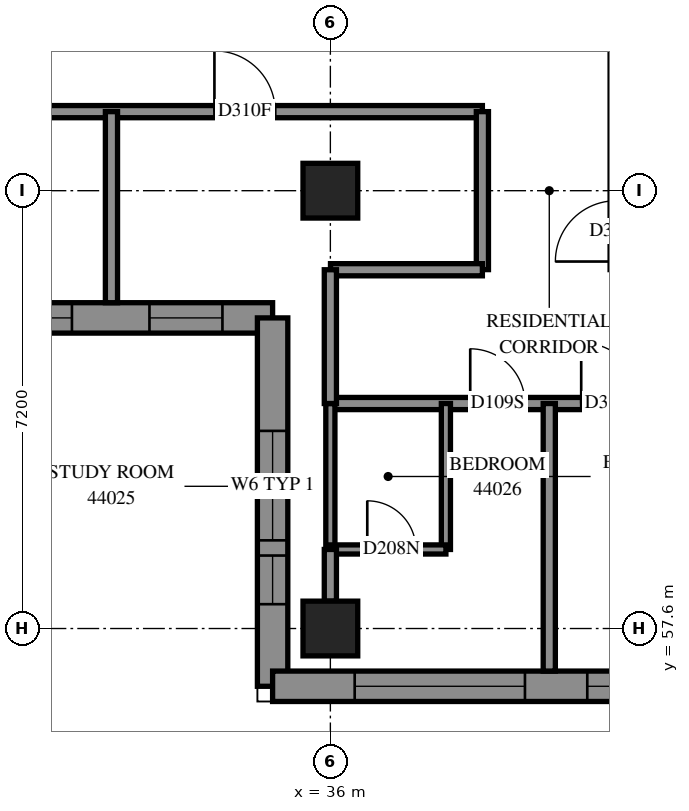
"""IFC4 building model, lengths in metres.
Left out: names, types, materials, properties, quantities, classifications, styles, units other than length and angle.
Written with IfcOpenShell. Run it as: python <this file> out.ifc"""

import sys

from ifc_helpers import new_model, si_unit, direction, frame, frame_2d, origin, origin_2d, place, context, subcontext, project, spatial, polyline, rectangle, outline, extrude, element, fill, save


model = new_model("IFC4")
c1 = context("Model", 3, precision=1e-05, world=origin(), true_north=direction((0.0, 1.0)))
c2 = subcontext(c1, "Body", "Model", "MODEL_VIEW")
j1 = project(units=[si_unit("LENGTHUNIT", "METRE"), si_unit("PLANEANGLEUNIT", "RADIAN")], contexts=[c1])
p1 = place(None, origin())
s1 = spatial("IfcSite", under=j1, at=p1, CompositionType="ELEMENT")
p2 = place(p1, origin())
s2 = spatial("IfcBuilding", under=s1, at=p2, CompositionType="ELEMENT")
p3 = place(p2, frame((0.0, 0.0, 162.6)))
s3 = spatial("IfcBuildingStorey", under=s2, at=p3, CompositionType="ELEMENT", Elevation=162.6)
for number, where, z_axis, x_axis in (
    (1, (36.0, 57.6, 0.0), (0.0, 0.0, 1.0), (1.0, 0.0, 0.0)),
    (2, (36.0, 64.8, 0.0), (0.0, 0.0, 1.0), (1.0, 0.0, 0.0)),
):
    element("IfcColumn", number, at=place(p3, frame(where, z_axis=z_axis, x_axis=x_axis)), inside=s3, PredefinedType="COLUMN", context=c2, shape_type="SweptSolid", body=[
        extrude(rectangle(XDim=0.9, YDim=0.9, at=origin_2d()), origin(), (0.0, 0.0, 1.0), 3.1),
    ])
p4 = place(p3, frame((19.508, 62.708, 0.0), z_axis=(0.0, 0.0, 1.0), x_axis=(1.0, 0.0, 0.0)))
e3 = element("IfcWall", 3, at=p4, inside=s3, PredefinedType="SOLIDWALL", context=c2, shape_type="SweptSolid", body=[
    extrude(outline(polyline([(-0.25, -0.25), (15.292, -0.25), (15.792, 0.25), (0.25, 0.25), (-0.25, -0.25)])), origin(), (0.0, 0.0, 1.0), 3.1),
])
p5 = place(p4, frame((2.492, 0.0, 0.45)))
e4 = element("IfcOpeningElement", 4, at=p5, cuts=e3, PredefinedType="OPENING", context=c2, shape_type="SweptSolid", body=[
    extrude(rectangle(XDim=2.8, YDim=2.5, at=frame_2d((1.4, 1.25))), frame((0.0, 0.26, 0.0), z_axis=(0.0, -1.0, 0.0), x_axis=(1.0, 0.0, 0.0)), (0.0, 0.0, 1.0), 0.52),
])
p6 = place(p4, frame((6.092, 0.0, 0.45)))
e5 = element("IfcOpeningElement", 5, at=p6, cuts=e3, PredefinedType="OPENING", context=c2, shape_type="SweptSolid", body=[
    extrude(rectangle(XDim=2.8, YDim=2.5, at=frame_2d((1.4, 1.25))), frame((0.0, 0.26, 0.0), z_axis=(0.0, -1.0, 0.0), x_axis=(1.0, 0.0, 0.0)), (0.0, 0.0, 1.0), 0.52),
])
p7 = place(p4, frame((9.442, 0.0, 0.45)))
e6 = element("IfcOpeningElement", 6, at=p7, cuts=e3, PredefinedType="OPENING", context=c2, shape_type="SweptSolid", body=[
    extrude(rectangle(XDim=2.8, YDim=2.5, at=frame_2d((1.4, 1.25))), frame((0.0, 0.26, 0.0), z_axis=(0.0, -1.0, 0.0), x_axis=(1.0, 0.0, 0.0)), (0.0, 0.0, 1.0), 0.52),
])
p8 = place(p4, frame((0.671, 0.0, 0.45)))
e7 = element("IfcOpeningElement", 7, at=p8, cuts=e3, PredefinedType="OPENING", context=c2, shape_type="SweptSolid", body=[
    extrude(rectangle(XDim=1.2, YDim=2.5, at=frame_2d((0.6, 1.25))), frame((0.0, 0.26, 0.0), z_axis=(0.0, -1.0, 0.0), x_axis=(1.0, 0.0, 0.0)), (0.0, 0.0, 1.0), 0.52),
])
p9 = place(p4, frame((13.517, 0.0, 0.45)))
e8 = element("IfcOpeningElement", 8, at=p9, cuts=e3, PredefinedType="OPENING", context=c2, shape_type="SweptSolid", body=[
    extrude(rectangle(XDim=1.2, YDim=2.5, at=frame_2d((0.6, 1.25))), frame((0.0, 0.26, 0.0), z_axis=(0.0, -1.0, 0.0), x_axis=(1.0, 0.0, 0.0)), (0.0, 0.0, 1.0), 0.52),
])
p10 = place(p3, frame((35.05, 62.708, 0.0), z_axis=(0.0, 0.0, 1.0), x_axis=(0.0, -1.0, 0.0)))
e9 = element("IfcWall", 9, at=p10, inside=s3, PredefinedType="SOLIDWALL", context=c2, shape_type="SweptSolid", body=[
    extrude(outline(polyline([(0.25, -0.25), (6.308, -0.25), (5.808, 0.25), (-0.25, 0.25), (0.25, -0.25)])), origin(), (0.0, 0.0, 1.0), 3.1),
])
p11 = place(p10, frame((1.858, 0.0, 0.7)))
e10 = element("IfcOpeningElement", 10, at=p11, cuts=e9, PredefinedType="OPENING", context=c2, shape_type="SweptSolid", body=[
    extrude(rectangle(XDim=1.8, YDim=2.2, at=frame_2d((0.9, 1.1))), frame((0.0, 0.26, 0.0), z_axis=(0.0, -1.0, 0.0), x_axis=(1.0, 0.0, 0.0)), (0.0, 0.0, 1.0), 0.52),
])
p12 = place(p10, frame((3.908, 0.0, 0.45)))
e11 = element("IfcOpeningElement", 11, at=p12, cuts=e9, PredefinedType="OPENING", context=c2, shape_type="SweptSolid", body=[
    extrude(rectangle(XDim=0.8, YDim=2.5, at=frame_2d((0.4, 1.25))), frame((0.0, 0.26, 0.0), z_axis=(0.0, -1.0, 0.0), x_axis=(1.0, 0.0, 0.0)), (0.0, 0.0, 1.0), 0.52),
])
p13 = place(p3, frame((35.05, 56.65, 0.0), z_axis=(0.0, 0.0, 1.0), x_axis=(1.0, 0.0, 0.0)))
e12 = element("IfcWall", 12, at=p13, inside=s3, PredefinedType="SOLIDWALL", context=c2, shape_type="SweptSolid", body=[
    extrude(outline(polyline([(-0.25, -0.25), (6.95, -0.25), (7.45, 0.25), (0.25, 0.25), (-0.25, -0.25)])), origin(), (0.0, 0.0, 1.0), 3.1),
])
p14 = place(p13, frame((1.35, 0.0, 0.45)))
e13 = element("IfcOpeningElement", 13, at=p14, cuts=e12, PredefinedType="OPENING", context=c2, shape_type="SweptSolid", body=[
    extrude(rectangle(XDim=2.8, YDim=2.5, at=frame_2d((1.4, 1.25))), frame((0.0, 0.26, 0.0), z_axis=(0.0, -1.0, 0.0), x_axis=(1.0, 0.0, 0.0)), (0.0, 0.0, 1.0), 0.52),
])
p15 = place(p13, frame((5.175, 0.0, 0.45)))
e14 = element("IfcOpeningElement", 14, at=p15, cuts=e12, PredefinedType="OPENING", context=c2, shape_type="SweptSolid", body=[
    extrude(rectangle(XDim=1.2, YDim=2.5, at=frame_2d((0.6, 1.25))), frame((0.0, 0.26, 0.0), z_axis=(0.0, -1.0, 0.0), x_axis=(1.0, 0.0, 0.0)), (0.0, 0.0, 1.0), 0.52),
])
p16 = place(p3, frame((21.6, 66.1, 0.0), z_axis=(0.0, 0.0, 1.0), x_axis=(1.0, 0.0, 0.0)))
e15 = element("IfcWall", 15, at=p16, inside=s3, PredefinedType="PARTITIONING", context=c2, shape_type="SweptSolid", body=[
    extrude(rectangle(XDim=16.9, YDim=0.2, at=frame_2d((8.45, 0.0))), origin(), (0.0, 0.0, 1.0), 3.1),
])
p17 = place(p16, frame((12.493, 0.0, 0.0)))
e16 = element("IfcOpeningElement", 16, at=p17, cuts=e15, PredefinedType="OPENING", context=c2, shape_type="SweptSolid", body=[
    extrude(rectangle(XDim=1.0, YDim=2.1, at=frame_2d((0.5, 1.05))), frame((0.0, 0.11, 0.0), z_axis=(0.0, -1.0, 0.0), x_axis=(1.0, 0.0, 0.0)), (0.0, 0.0, 1.0), 0.22),
])
p18 = place(p3, frame((36.0, 61.3, 0.0), z_axis=(0.0, 0.0, 1.0), x_axis=(1.0, 0.0, 0.0)))
e17 = element("IfcWall", 17, at=p18, inside=s3, PredefinedType="PARTITIONING", context=c2, shape_type="SweptSolid", body=[
    extrude(rectangle(XDim=16.9, YDim=0.2, at=frame_2d((8.45, 0.0))), origin(), (0.0, 0.0, 1.0), 3.1),
])
p19 = place(p18, frame((2.3, 0.0, 0.0)))
e18 = element("IfcOpeningElement", 18, at=p19, cuts=e17, PredefinedType="OPENING", context=c2, shape_type="SweptSolid", body=[
    extrude(rectangle(XDim=0.9, YDim=2.1, at=frame_2d((0.45, 1.05))), frame((0.0, 0.11, 0.0), z_axis=(0.0, -1.0, 0.0), x_axis=(1.0, 0.0, 0.0)), (0.0, 0.0, 1.0), 0.22),
])
p20 = place(p18, frame((4.125, 0.0, 0.0)))
e19 = element("IfcOpeningElement", 19, at=p20, cuts=e17, PredefinedType="OPENING", context=c2, shape_type="SweptSolid", body=[
    extrude(rectangle(XDim=1.0, YDim=2.1, at=frame_2d((0.5, 1.05))), frame((0.0, 0.11, 0.0), z_axis=(0.0, -1.0, 0.0), x_axis=(1.0, 0.0, 0.0)), (0.0, 0.0, 1.0), 0.22),
])
p21 = place(p18, frame((9.5, 0.0, 0.0)))
e20 = element("IfcOpeningElement", 20, at=p21, cuts=e17, PredefinedType="OPENING", context=c2, shape_type="SweptSolid", body=[
    extrude(rectangle(XDim=0.9, YDim=2.1, at=frame_2d((0.45, 1.05))), frame((0.0, 0.11, 0.0), z_axis=(0.0, -1.0, 0.0), x_axis=(1.0, 0.0, 0.0)), (0.0, 0.0, 1.0), 0.22),
])
p22 = place(p18, frame((11.325, 0.0, 0.0)))
e21 = element("IfcOpeningElement", 21, at=p22, cuts=e17, PredefinedType="OPENING", context=c2, shape_type="SweptSolid", body=[
    extrude(rectangle(XDim=1.0, YDim=2.1, at=frame_2d((0.5, 1.05))), frame((0.0, 0.11, 0.0), z_axis=(0.0, -1.0, 0.0), x_axis=(1.0, 0.0, 0.0)), (0.0, 0.0, 1.0), 0.22),
])
p23 = place(p18, frame((15.647, 0.0, 0.0)))
e22 = element("IfcOpeningElement", 22, at=p23, cuts=e17, PredefinedType="OPENING", context=c2, shape_type="SweptSolid", body=[
    extrude(rectangle(XDim=1.0, YDim=2.1, at=frame_2d((0.5, 1.05))), frame((0.0, 0.11, 0.0), z_axis=(0.0, -1.0, 0.0), x_axis=(1.0, 0.0, 0.0)), (0.0, 0.0, 1.0), 0.22),
])
p24 = place(p3, frame((39.6, 56.9, 0.0), z_axis=(0.0, 0.0, 1.0), x_axis=(0.0, 1.0, 0.0)))
e23 = element("IfcWall", 23, at=p24, inside=s3, PredefinedType="PARTITIONING", context=c2, shape_type="SweptSolid", body=[
    extrude(rectangle(XDim=4.4, YDim=0.2, at=frame_2d((2.2, 0.0))), origin(), (0.0, 0.0, 1.0), 3.1),
])
p25 = place(p3, frame((32.4, 62.958, 0.0), z_axis=(0.0, 0.0, 1.0), x_axis=(0.0, 1.0, 0.0)))
e24 = element("IfcWall", 24, at=p25, inside=s3, PredefinedType="PARTITIONING", context=c2, shape_type="SweptSolid", body=[
    extrude(rectangle(XDim=3.142, YDim=0.2, at=frame_2d((1.571, 0.0))), origin(), (0.0, 0.0, 1.0), 3.1),
])
p26 = place(p3, frame((38.5, 63.502, 0.0), z_axis=(0.0, 0.0, 1.0), x_axis=(0.0, 1.0, 0.0)))
e25 = element("IfcWall", 25, at=p26, inside=s3, PredefinedType="PARTITIONING", context=c2, shape_type="SweptSolid", body=[
    extrude(rectangle(XDim=2.598, YDim=0.2, at=frame_2d((1.299, 0.0))), origin(), (0.0, 0.0, 1.0), 3.1),
])
p27 = place(p3, frame((36.002, 63.5, 0.0), z_axis=(0.0, 0.0, 1.0), x_axis=(1.0, 0.0, 0.0)))
e26 = element("IfcWall", 26, at=p27, inside=s3, PredefinedType="PARTITIONING", context=c2, shape_type="SweptSolid", body=[
    extrude(rectangle(XDim=2.498, YDim=0.2, at=frame_2d((1.249, 0.0))), origin(), (0.0, 0.0, 1.0), 3.1),
])
p28 = place(p3, frame((37.9, 58.9, 0.0), z_axis=(0.0, 0.0, 1.0), x_axis=(0.0, 1.0, 0.0)))
e27 = element("IfcWall", 27, at=p28, inside=s3, PredefinedType="PARTITIONING", context=c2, shape_type="SweptSolid", body=[
    extrude(rectangle(XDim=2.4, YDim=0.15, at=frame_2d((1.2, 0.0))), origin(), (0.0, 0.0, 1.0), 3.1),
])
p29 = place(p3, frame((36.0, 58.9, 0.0), z_axis=(0.0, 0.0, 1.0), x_axis=(0.0, 1.0, 0.0)))
e28 = element("IfcWall", 28, at=p29, inside=s3, PredefinedType="PARTITIONING", context=c2, shape_type="SweptSolid", body=[
    extrude(rectangle(XDim=2.4, YDim=0.15, at=frame_2d((1.2, 0.0))), origin(), (0.0, 0.0, 1.0), 2.6),
])
p30 = place(p3, frame((36.0, 61.3, 0.0), z_axis=(0.0, 0.0, 1.0), x_axis=(0.0, 1.0, 0.0)))
e29 = element("IfcWall", 29, at=p30, inside=s3, PredefinedType="PARTITIONING", context=c2, shape_type="SweptSolid", body=[
    extrude(rectangle(XDim=2.2, YDim=0.2, at=frame_2d((1.1, 0.0))), origin(), (0.0, 0.0, 1.0), 2.6),
])
p31 = place(p3, frame((36.0, 58.9, 0.0), z_axis=(0.0, 0.0, 1.0), x_axis=(1.0, 0.0, 0.0)))
e30 = element("IfcWall", 30, at=p31, inside=s3, PredefinedType="PARTITIONING", context=c2, shape_type="SweptSolid", body=[
    extrude(rectangle(XDim=1.9, YDim=0.15, at=frame_2d((0.95, 0.0))), origin(), (0.0, 0.0, 1.0), 3.1),
])
p32 = place(p31, frame((0.607, 0.0, 0.0)))
e31 = element("IfcOpeningElement", 31, at=p32, cuts=e30, PredefinedType="OPENING", context=c2, shape_type="SweptSolid", body=[
    extrude(rectangle(XDim=0.8, YDim=2.1, at=frame_2d((0.4, 1.05))), frame((0.0, 0.085, 0.0), z_axis=(0.0, -1.0, 0.0), x_axis=(1.0, 0.0, 0.0)), (0.0, 0.0, 1.0), 0.17),
])
p33 = place(p3, frame((36.0, 58.05, 0.0), z_axis=(0.0, 0.0, 1.0), x_axis=(0.0, 1.0, 0.0)))
e32 = element("IfcWall", 32, at=p33, inside=s3, PredefinedType="PARTITIONING", context=c2, shape_type="SweptSolid", body=[
    extrude(rectangle(XDim=0.85, YDim=0.2, at=frame_2d((0.425, 0.0))), origin(), (0.0, 0.0, 1.0), 2.6),
])
p34 = place(p7, origin())
e33 = element("IfcWindow", 33, at=p34, inside=s3, PartitioningType="SINGLE_PANEL", PredefinedType="WINDOW", context=c2, shape_type="SweptSolid", body=[
    extrude(rectangle(XDim=2.8, YDim=2.5, at=frame_2d((1.4, 1.25))), frame((0.0, 0.18, 0.0), z_axis=(0.0, -1.0, 0.0), x_axis=(1.0, 0.0, 0.0)), (0.0, 0.0, 1.0), 0.06),
])
fill(e6, e33)
p35 = place(p9, origin())
e34 = element("IfcWindow", 34, at=p35, inside=s3, PartitioningType="SINGLE_PANEL", PredefinedType="WINDOW", context=c2, shape_type="SweptSolid", body=[
    extrude(rectangle(XDim=1.2, YDim=2.5, at=frame_2d((0.6, 1.25))), frame((0.0, 0.18, 0.0), z_axis=(0.0, -1.0, 0.0), x_axis=(1.0, 0.0, 0.0)), (0.0, 0.0, 1.0), 0.06),
])
fill(e8, e34)
p36 = place(p14, origin())
e35 = element("IfcWindow", 35, at=p36, inside=s3, PartitioningType="SINGLE_PANEL", PredefinedType="WINDOW", context=c2, shape_type="SweptSolid", body=[
    extrude(rectangle(XDim=2.8, YDim=2.5, at=frame_2d((1.4, 1.25))), frame((0.0, 0.18, 0.0), z_axis=(0.0, -1.0, 0.0), x_axis=(1.0, 0.0, 0.0)), (0.0, 0.0, 1.0), 0.06),
])
fill(e13, e35)
p37 = place(p15, origin())
e36 = element("IfcWindow", 36, at=p37, inside=s3, PartitioningType="SINGLE_PANEL", PredefinedType="WINDOW", context=c2, shape_type="SweptSolid", body=[
    extrude(rectangle(XDim=1.2, YDim=2.5, at=frame_2d((0.6, 1.25))), frame((0.0, 0.18, 0.0), z_axis=(0.0, -1.0, 0.0), x_axis=(1.0, 0.0, 0.0)), (0.0, 0.0, 1.0), 0.06),
])
fill(e14, e36)
p38 = place(p17, origin())
e37 = element("IfcDoor", 37, at=p38, inside=s3, OperationType="SINGLE_SWING_RIGHT", PredefinedType="DOOR", context=c2, shape_type="SweptSolid", body=[
    extrude(rectangle(XDim=1.0, YDim=2.1, at=frame_2d((0.5, 1.05))), frame((0.0, 0.025, 0.0), z_axis=(0.0, -1.0, 0.0), x_axis=(1.0, 0.0, 0.0)), (0.0, 0.0, 1.0), 0.05),
])
fill(e16, e37)
p39 = place(p19, origin())
e38 = element("IfcDoor", 38, at=p39, inside=s3, OperationType="SINGLE_SWING_LEFT", PredefinedType="DOOR", context=c2, shape_type="SweptSolid", body=[
    extrude(rectangle(XDim=0.9, YDim=2.1, at=frame_2d((0.45, 1.05))), frame((0.0, 0.025, 0.0), z_axis=(0.0, -1.0, 0.0), x_axis=(1.0, 0.0, 0.0)), (0.0, 0.0, 1.0), 0.05),
])
fill(e18, e38)
p40 = place(p32, origin())
e39 = element("IfcDoor", 39, at=p40, inside=s3, OperationType="SINGLE_SWING_RIGHT", PredefinedType="DOOR", context=c2, shape_type="SweptSolid", body=[
    extrude(rectangle(XDim=0.8, YDim=2.1, at=frame_2d((0.4, 1.05))), frame((0.0, 0.025, 0.0), z_axis=(0.0, -1.0, 0.0), x_axis=(1.0, 0.0, 0.0)), (0.0, 0.0, 1.0), 0.05),
])
fill(e31, e39)
p41 = place(p20, origin())
e40 = element("IfcDoor", 40, at=p41, inside=s3, OperationType="SINGLE_SWING_RIGHT", PredefinedType="DOOR", context=c2, shape_type="SweptSolid", body=[
    extrude(rectangle(XDim=1.0, YDim=2.1, at=frame_2d((0.5, 1.05))), frame((0.0, 0.025, 0.0), z_axis=(0.0, -1.0, 0.0), x_axis=(1.0, 0.0, 0.0)), (0.0, 0.0, 1.0), 0.05),
])
fill(e19, e40)
p42 = place(p11, origin())
e41 = element("IfcWindow", 41, at=p42, inside=s3, PartitioningType="SINGLE_PANEL", PredefinedType="WINDOW", context=c2, shape_type="SweptSolid", body=[
    extrude(rectangle(XDim=1.8, YDim=2.2, at=frame_2d((0.9, 1.1))), frame((0.0, 0.18, 0.0), z_axis=(0.0, -1.0, 0.0), x_axis=(1.0, 0.0, 0.0)), (0.0, 0.0, 1.0), 0.06),
])
fill(e10, e41)
p43 = place(p12, origin())
e42 = element("IfcWindow", 42, at=p43, inside=s3, PartitioningType="SINGLE_PANEL", PredefinedType="WINDOW", context=c2, shape_type="SweptSolid", body=[
    extrude(rectangle(XDim=0.8, YDim=2.5, at=frame_2d((0.4, 1.25))), frame((0.0, 0.18, 0.0), z_axis=(0.0, -1.0, 0.0), x_axis=(1.0, 0.0, 0.0)), (0.0, 0.0, 1.0), 0.06),
])
fill(e11, e42)
save(model, sys.argv[1])
